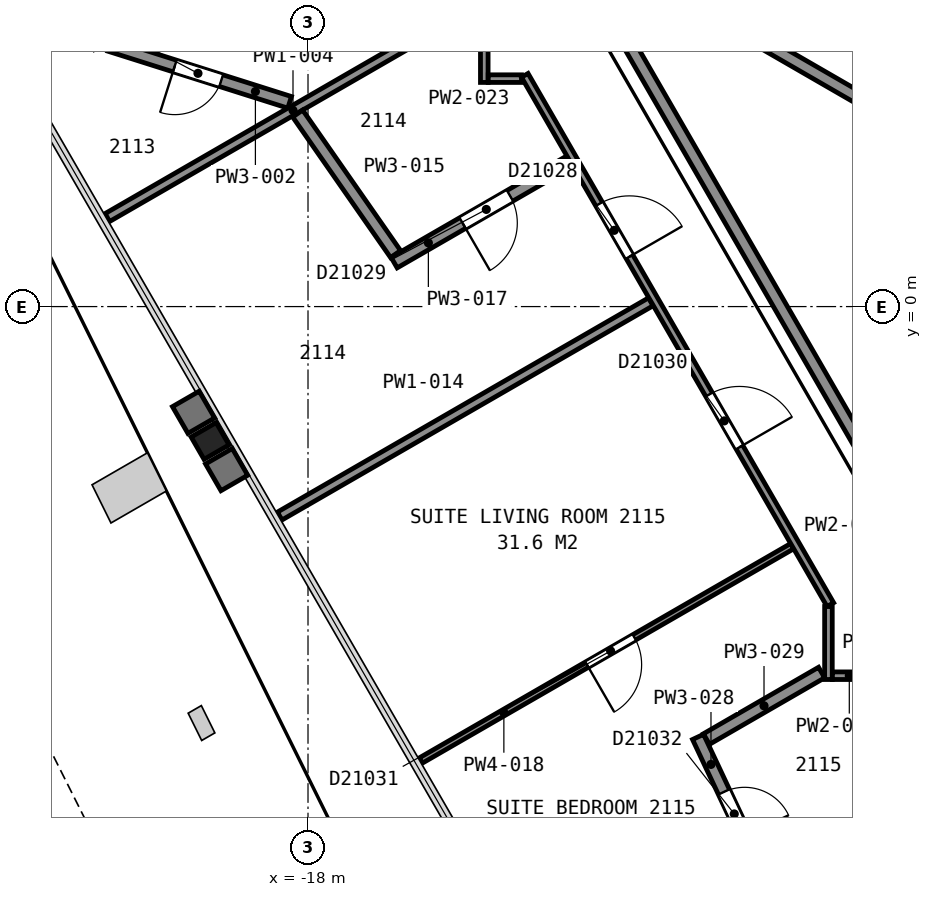
"""IFC4 building model, lengths in metres.
Left out: names, types, materials, properties, quantities, classifications, styles, units other than length and angle.
Written with IfcOpenShell. Run it as: python <this file> out.ifc"""

import sys

from ifc_helpers import new_model, si_unit, direction, frame, frame_2d, origin, origin_2d, place, context, subcontext, project, spatial, rectangle, i_section, extrude, element, fill, save


model = new_model("IFC4")
c1 = context("Model", 3, precision=1e-05, world=origin(), true_north=direction((0.0, 1.0)))
c2 = subcontext(c1, "Body", "Model", "MODEL_VIEW")
j1 = project(units=[si_unit("LENGTHUNIT", "METRE"), si_unit("PLANEANGLEUNIT", "RADIAN")], contexts=[c1])
p1 = place(None, origin())
s1 = spatial("IfcSite", under=j1, at=p1, CompositionType="ELEMENT")
p2 = place(p1, origin())
s2 = spatial("IfcBuilding", under=s1, at=p2, CompositionType="ELEMENT")
p3 = place(p2, frame((0.0, 0.0, 92.8)))
s3 = spatial("IfcBuildingStorey", under=s2, at=p3, CompositionType="ELEMENT", Elevation=92.8)
p4 = place(p3, frame((-19.61, -2.21, 0.0), z_axis=(0.0, 0.0, 1.0), x_axis=(-0.5, 0.866025403784, 0.0)))
e1 = element("IfcColumn", 1, at=p4, inside=s3, PredefinedType="COLUMN", context=c2, shape_type="SweptSolid", body=[
    extrude(i_section(OverallWidth=0.424, OverallDepth=0.475, WebThickness=0.048, FlangeThickness=0.077, FilletRadius=0.015, at=origin_2d()), origin(), (0.0, 0.0, 1.0), 3.6),
])
p5 = place(p3, frame((-7.678, 2.701, 0.0), z_axis=(0.0, 0.0, 1.0), x_axis=(-0.866026010844, 0.49999894854, 0.0)))
e2 = element("IfcWall", 2, at=p5, inside=s3, PredefinedType="PARTITIONING", context=c2, shape_type="SweptSolid", body=[
    extrude(rectangle(XDim=12.0, YDim=0.2, at=frame_2d((6.0, 0.0))), origin(), (0.0, 0.0, 1.0), 3.35),
])
p6 = place(p3, frame((-13.664, 5.946, 0.0), z_axis=(0.0, 0.0, 1.0), x_axis=(0.499994327219, -0.866028678941, 0.0)))
e3 = element("IfcWall", 3, at=p6, inside=s3, PredefinedType="PARTITIONING", context=c2, shape_type="SweptSolid", body=[
    extrude(rectangle(XDim=23.968, YDim=0.2, at=frame_2d((11.984, 0.0))), origin(), (0.0, 0.0, 1.0), 3.35),
])
p7 = place(p3, frame((-21.263, 4.296, 0.0), z_axis=(0.0, 0.0, 1.0), x_axis=(0.95341383314, -0.301665481582, 0.0)))
e4 = element("IfcWall", 4, at=p7, inside=s3, PredefinedType="PARTITIONING", context=c2, shape_type="SweptSolid", body=[
    extrude(rectangle(XDim=3.106, YDim=0.2, at=frame_2d((1.553, 0.0))), origin(), (0.0, 0.0, 1.0), 2.613),
])
p8 = place(p7, frame((1.125, 0.0, 0.0)))
e5 = element("IfcOpeningElement", 5, at=p8, cuts=e4, PredefinedType="OPENING", context=c2, shape_type="SweptSolid", body=[
    extrude(rectangle(XDim=0.8, YDim=2.1, at=frame_2d((0.4, 1.05))), frame((0.0, 0.11, 0.0), z_axis=(0.0, -1.0, 0.0), x_axis=(1.0, 0.0, 0.0)), (0.0, 0.0, 1.0), 0.22),
])
p9 = place(p3, frame((-21.301, 1.464, 0.0), z_axis=(0.0, 0.0, 1.0), x_axis=(0.866055299146, 0.49994821614, 0.0)))
e6 = element("IfcWall", 6, at=p9, inside=s3, PredefinedType="PARTITIONING", context=c2, shape_type="SweptSolid", body=[
    extrude(rectangle(XDim=7.052, YDim=0.15, at=frame_2d((3.526, 0.0))), origin(), (0.0, 0.0, 1.0), 2.613),
])
p10 = place(p3, frame((-18.466, -3.445, 0.0), z_axis=(0.0, 0.0, 1.0), x_axis=(0.86605175433, 0.499954356739, 0.0)))
e7 = element("IfcWall", 7, at=p10, inside=s3, PredefinedType="PARTITIONING", context=c2, shape_type="SweptSolid", body=[
    extrude(rectangle(XDim=7.048, YDim=0.15, at=frame_2d((3.524, 0.0))), origin(), (0.0, 0.0, 1.0), 2.613),
])
p11 = place(p3, frame((-18.17, 3.175, 0.0), z_axis=(0.0, 0.0, 1.0), x_axis=(0.571541682724, -0.820573034476, 0.0)))
e8 = element("IfcWall", 8, at=p11, inside=s3, PredefinedType="PARTITIONING", context=c2, shape_type="SweptSolid", body=[
    extrude(rectangle(XDim=2.818, YDim=0.2, at=frame_2d((1.409, 0.0))), origin(), (0.0, 0.0, 1.0), 2.613),
])
p12 = place(p3, frame((-16.583, 0.723, 0.0), z_axis=(0.0, 0.0, 1.0), x_axis=(0.866001642064, 0.500041154249, 0.0)))
e9 = element("IfcWall", 9, at=p12, inside=s3, PredefinedType="PARTITIONING", context=c2, shape_type="SweptSolid", body=[
    extrude(rectangle(XDim=3.338, YDim=0.2, at=frame_2d((1.669, 0.0))), origin(), (0.0, 0.0, 1.0), 2.613),
])
p13 = place(p12, frame((1.3, 0.0, 0.0)))
e10 = element("IfcOpeningElement", 10, at=p13, cuts=e9, PredefinedType="OPENING", context=c2, shape_type="SweptSolid", body=[
    extrude(rectangle(XDim=0.9, YDim=2.1, at=frame_2d((0.45, 1.05))), frame((0.0, 0.11, 0.0), z_axis=(0.0, -1.0, 0.0), x_axis=(1.0, 0.0, 0.0)), (0.0, 0.0, 1.0), 0.22),
])
p14 = place(p3, frame((-10.037, -3.94, 0.0), z_axis=(0.0, 0.0, 1.0), x_axis=(-0.866063951978, -0.499933226626, 0.0)))
e11 = element("IfcWall", 11, at=p14, inside=s3, PredefinedType="PARTITIONING", context=c2, shape_type="SweptSolid", body=[
    extrude(rectangle(XDim=7.052, YDim=0.1, at=frame_2d((3.526, 0.0))), origin(), (0.0, 0.0, 1.0), 2.613),
])
p15 = place(p14, frame((2.998, 0.0, 0.0)))
e12 = element("IfcOpeningElement", 12, at=p15, cuts=e11, PredefinedType="OPENING", context=c2, shape_type="SweptSolid", body=[
    extrude(rectangle(XDim=0.9, YDim=2.1, at=frame_2d((0.45, 1.05))), frame((0.0, 0.06, 0.0), z_axis=(0.0, -1.0, 0.0), x_axis=(1.0, 0.0, 0.0)), (0.0, 0.0, 1.0), 0.12),
])
p16 = place(p3, frame((-15.101, 3.687, 0.0), z_axis=(0.0, 0.0, 1.0), x_axis=(0.0, 1.0, 0.0)))
e13 = element("IfcWall", 13, at=p16, inside=s3, PredefinedType="PARTITIONING", context=c2, shape_type="SweptSolid", body=[
    extrude(rectangle(XDim=1.236, YDim=0.125, at=frame_2d((0.618, 0.0))), origin(), (0.0, 0.0, 1.0), 2.613),
])
p17 = place(p3, frame((-15.036, 3.749, 0.0), z_axis=(0.0, 0.0, 1.0), x_axis=(1.0, 0.0, 0.0)))
e14 = element("IfcWall", 14, at=p17, inside=s3, PredefinedType="PARTITIONING", context=c2, shape_type="SweptSolid", body=[
    extrude(rectangle(XDim=0.547, YDim=0.125, at=frame_2d((0.273, 0.0))), origin(), (0.0, 0.0, 1.0), 2.613),
])
p18 = place(p3, frame((-9.41, -4.902, 0.0), z_axis=(0.0, 0.0, 1.0), x_axis=(-0.499971244726, 0.866042005013, 0.0)))
e15 = element("IfcWall", 15, at=p18, inside=s3, PredefinedType="PARTITIONING", context=c2, shape_type="SweptSolid", body=[
    extrude(rectangle(XDim=10.052, YDim=0.125, at=frame_2d((5.026, 0.0))), origin(), (0.0, 0.0, 1.0), 2.613),
])
p19 = place(p18, frame((6.608, 0.0, 0.0)))
e16 = element("IfcOpeningElement", 16, at=p19, cuts=e15, PredefinedType="OPENING", context=c2, shape_type="SweptSolid", body=[
    extrude(rectangle(XDim=1.0, YDim=2.1, at=frame_2d((0.5, 1.05))), frame((0.0, 0.073, 0.0), z_axis=(0.0, -1.0, 0.0), x_axis=(1.0, 0.0, 0.0)), (0.0, 0.0, 1.0), 0.145),
])
p20 = place(p18, frame((2.989, 0.0, 0.0)))
e17 = element("IfcOpeningElement", 17, at=p20, cuts=e15, PredefinedType="OPENING", context=c2, shape_type="SweptSolid", body=[
    extrude(rectangle(XDim=1.0, YDim=2.1, at=frame_2d((0.5, 1.05))), frame((0.0, 0.073, 0.0), z_axis=(0.0, -1.0, 0.0), x_axis=(1.0, 0.0, 0.0)), (0.0, 0.0, 1.0), 0.145),
])
p21 = place(p3, frame((-13.823, -11.487, 0.0), z_axis=(0.0, 0.0, 1.0), x_axis=(0.865980767462, 0.500077304409, 0.0)))
e18 = element("IfcWall", 18, at=p21, inside=s3, PredefinedType="PARTITIONING", context=c2, shape_type="SweptSolid", body=[
    extrude(rectangle(XDim=7.047, YDim=0.15, at=frame_2d((3.524, 0.0))), origin(), (0.0, 0.0, 1.0), 2.613),
])
p22 = place(p3, frame((-11.585, -7.077, 0.0), z_axis=(0.0, 0.0, 1.0), x_axis=(0.425434257814, -0.904989332688, 0.0)))
e19 = element("IfcWall", 19, at=p22, inside=s3, PredefinedType="PARTITIONING", context=c2, shape_type="SweptSolid", body=[
    extrude(rectangle(XDim=2.625, YDim=0.2, at=frame_2d((1.313, 0.0))), origin(), (0.0, 0.0, 1.0), 2.613),
])
p23 = place(p22, frame((1.0, 0.0, 0.0)))
e20 = element("IfcOpeningElement", 20, at=p23, cuts=e19, PredefinedType="OPENING", context=c2, shape_type="SweptSolid", body=[
    extrude(rectangle(XDim=0.8, YDim=2.1, at=frame_2d((0.4, 1.05))), frame((0.0, 0.11, 0.0), z_axis=(0.0, -1.0, 0.0), x_axis=(1.0, 0.0, 0.0)), (0.0, 0.0, 1.0), 0.22),
])
p24 = place(p3, frame((-11.448, -7.113, 0.0), z_axis=(0.0, 0.0, 1.0), x_axis=(0.865960673566, 0.500112099272, 0.0)))
e21 = element("IfcWall", 21, at=p24, inside=s3, PredefinedType="PARTITIONING", context=c2, shape_type="SweptSolid", body=[
    extrude(rectangle(XDim=2.188, YDim=0.2, at=frame_2d((1.094, 0.0))), origin(), (0.0, 0.0, 1.0), 2.613),
])
p25 = place(p3, frame((-9.441, -6.134, 0.0), z_axis=(0.0, 0.0, 1.0), x_axis=(0.0, 1.0, 0.0)))
e22 = element("IfcWall", 22, at=p25, inside=s3, PredefinedType="PARTITIONING", context=c2, shape_type="SweptSolid", body=[
    extrude(rectangle(XDim=1.2, YDim=0.125, at=frame_2d((0.6, 0.0))), origin(), (0.0, 0.0, 1.0), 2.613),
])
p26 = place(p3, frame((-9.376, -6.071, 0.0), z_axis=(0.0, 0.0, 1.0), x_axis=(1.0, 0.0, 0.0)))
e23 = element("IfcWall", 23, at=p26, inside=s3, PredefinedType="PARTITIONING", context=c2, shape_type="SweptSolid", body=[
    extrude(rectangle(XDim=0.556, YDim=0.125, at=frame_2d((0.278, 0.0))), origin(), (0.0, 0.0, 1.0), 2.613),
])
p27 = place(p8, origin())
e24 = element("IfcDoor", 24, at=p27, inside=s3, OperationType="SINGLE_SWING_LEFT", PredefinedType="DOOR", context=c2, shape_type="SweptSolid", body=[
    extrude(rectangle(XDim=0.8, YDim=2.1, at=frame_2d((0.4, 1.05))), frame((0.0, 0.025, 0.0), z_axis=(0.0, -1.0, 0.0), x_axis=(1.0, 0.0, 0.0)), (0.0, 0.0, 1.0), 0.05),
])
fill(e5, e24)
p28 = place(p13, origin())
e25 = element("IfcDoor", 25, at=p28, inside=s3, OperationType="SINGLE_SWING_LEFT", PredefinedType="DOOR", context=c2, shape_type="SweptSolid", body=[
    extrude(rectangle(XDim=0.9, YDim=2.1, at=frame_2d((0.45, 1.05))), frame((0.0, 0.025, 0.0), z_axis=(0.0, -1.0, 0.0), x_axis=(1.0, 0.0, 0.0)), (0.0, 0.0, 1.0), 0.05),
])
fill(e10, e25)
p29 = place(p15, origin())
e26 = element("IfcDoor", 26, at=p29, inside=s3, OperationType="SINGLE_SWING_RIGHT", PredefinedType="DOOR", context=c2, shape_type="SweptSolid", body=[
    extrude(rectangle(XDim=0.9, YDim=2.1, at=frame_2d((0.45, 1.05))), frame((0.0, 0.025, 0.0), z_axis=(0.0, -1.0, 0.0), x_axis=(1.0, 0.0, 0.0)), (0.0, 0.0, 1.0), 0.05),
])
fill(e12, e26)
p30 = place(p19, origin())
e27 = element("IfcDoor", 27, at=p30, inside=s3, OperationType="SINGLE_SWING_LEFT", PredefinedType="DOOR", context=c2, shape_type="SweptSolid", body=[
    extrude(rectangle(XDim=1.0, YDim=2.1, at=frame_2d((0.5, 1.05))), frame((0.0, 0.025, 0.0), z_axis=(0.0, -1.0, 0.0), x_axis=(1.0, 0.0, 0.0)), (0.0, 0.0, 1.0), 0.05),
])
fill(e16, e27)
p31 = place(p20, origin())
e28 = element("IfcDoor", 28, at=p31, inside=s3, OperationType="SINGLE_SWING_LEFT", PredefinedType="DOOR", context=c2, shape_type="SweptSolid", body=[
    extrude(rectangle(XDim=1.0, YDim=2.1, at=frame_2d((0.5, 1.05))), frame((0.0, 0.025, 0.0), z_axis=(0.0, -1.0, 0.0), x_axis=(1.0, 0.0, 0.0)), (0.0, 0.0, 1.0), 0.05),
])
fill(e17, e28)
p32 = place(p23, origin())
e29 = element("IfcDoor", 29, at=p32, inside=s3, OperationType="SINGLE_SWING_RIGHT", PredefinedType="DOOR", context=c2, shape_type="SweptSolid", body=[
    extrude(rectangle(XDim=0.8, YDim=2.1, at=frame_2d((0.4, 1.05))), frame((0.0, 0.025, 0.0), z_axis=(0.0, -1.0, 0.0), x_axis=(1.0, 0.0, 0.0)), (0.0, 0.0, 1.0), 0.05),
])
fill(e20, e29)
save(model, sys.argv[1])
